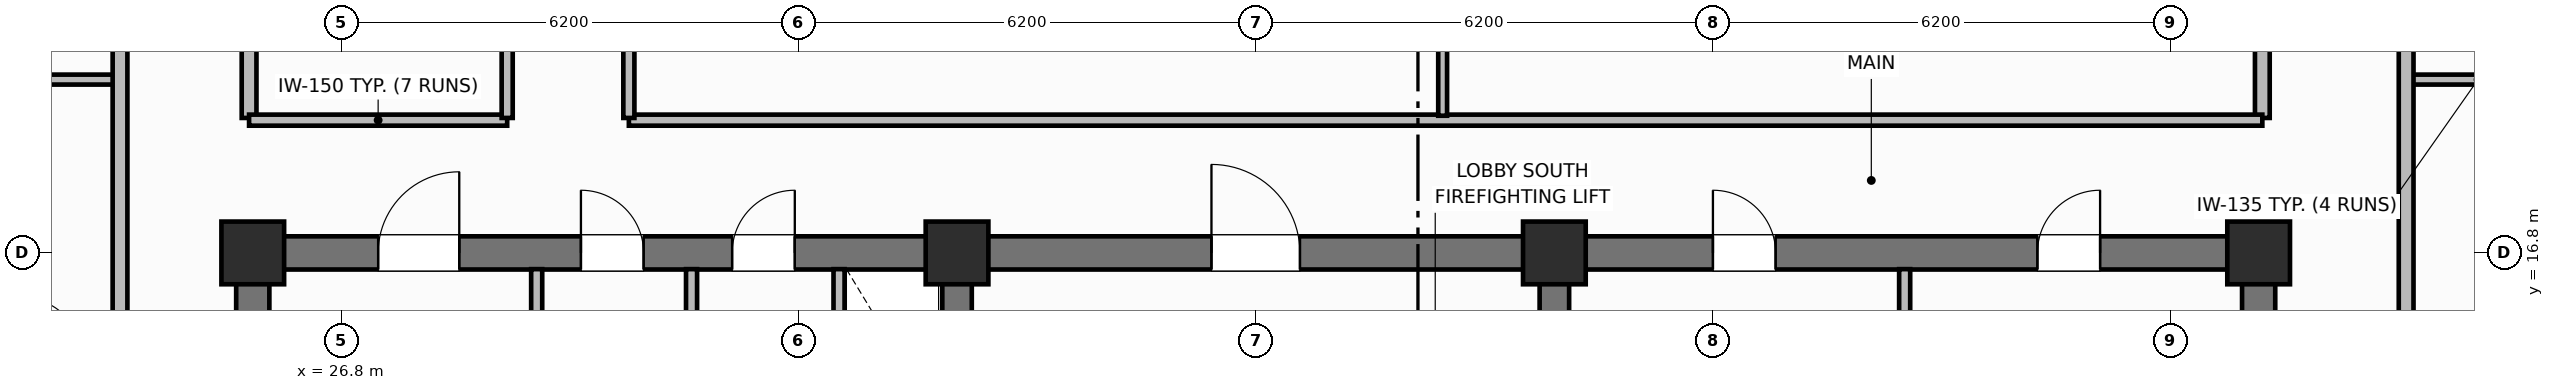
"""IFC4 building model, lengths in metres.
Left out: names, types, materials, properties, quantities, classifications, styles, units other than length and angle.
Written with IfcOpenShell. Run it as: python <this file> out.ifc"""

import sys

from ifc_helpers import new_model, si_unit, direction, frame, frame_2d, origin, origin_2d, place, context, subcontext, project, spatial, rectangle, extrude, element, fill, save


model = new_model("IFC4")
c1 = context("Model", 3, precision=1e-05, world=origin(), true_north=direction((0.0, 1.0)))
c2 = subcontext(c1, "Body", "Model", "MODEL_VIEW")
j1 = project(units=[si_unit("LENGTHUNIT", "METRE"), si_unit("PLANEANGLEUNIT", "RADIAN")], contexts=[c1])
p1 = place(None, origin())
s1 = spatial("IfcSite", under=j1, at=p1, CompositionType="ELEMENT")
p2 = place(p1, origin())
s2 = spatial("IfcBuilding", under=s1, at=p2, CompositionType="ELEMENT")
p3 = place(p2, frame((0.0, 0.0, 244.3)))
s3 = spatial("IfcBuildingStorey", under=s2, at=p3, CompositionType="ELEMENT", Elevation=244.3)
for number, where, z_axis, x_axis in (
    (1, (25.6, 10.825, 0.0), (0.0, 0.0, 1.0), (0.0, 1.0, 0.0)),
    (2, (52.8, 10.825, 0.0), (0.0, 0.0, 1.0), (0.0, 1.0, 0.0)),
):
    element("IfcWall", number, at=place(p3, frame(where, z_axis=z_axis, x_axis=x_axis)), inside=s3, PredefinedType="SHEAR", context=c2, shape_type="SweptSolid", body=[
        extrude(rectangle(XDim=5.75, YDim=0.45, at=frame_2d((2.875, 0.0))), origin(), (0.0, 0.0, 1.0), 3.7),
    ])
p4 = place(p3, frame((25.6, 16.8, 0.0), z_axis=(0.0, 0.0, 1.0), x_axis=(1.0, 0.0, 0.0)))
e3 = element("IfcWall", 3, at=p4, inside=s3, PredefinedType="SHEAR", context=c2, shape_type="SweptSolid", body=[
    extrude(rectangle(XDim=27.2, YDim=0.45, at=frame_2d((13.6, 0.0))), origin(), (0.0, 0.0, 1.0), 3.7),
])
p5 = place(p4, frame((1.7, 0.0, 0.0)))
e4 = element("IfcOpeningElement", 4, at=p5, cuts=e3, PredefinedType="OPENING", context=c2, shape_type="SweptSolid", body=[
    extrude(rectangle(XDim=1.1, YDim=2.15, at=frame_2d((0.55, 1.075))), frame((0.0, 0.235, 0.0), z_axis=(0.0, -1.0, 0.0), x_axis=(1.0, 0.0, 0.0)), (0.0, 0.0, 1.0), 0.47),
])
p6 = place(p4, frame((4.45, 0.0, 0.0)))
e5 = element("IfcOpeningElement", 5, at=p6, cuts=e3, PredefinedType="OPENING", context=c2, shape_type="SweptSolid", body=[
    extrude(rectangle(XDim=0.85, YDim=2.1, at=frame_2d((0.425, 1.05))), frame((0.0, 0.235, 0.0), z_axis=(0.0, -1.0, 0.0), x_axis=(1.0, 0.0, 0.0)), (0.0, 0.0, 1.0), 0.47),
])
p7 = place(p4, frame((6.5, 0.0, 0.0)))
e6 = element("IfcOpeningElement", 6, at=p7, cuts=e3, PredefinedType="OPENING", context=c2, shape_type="SweptSolid", body=[
    extrude(rectangle(XDim=0.85, YDim=2.1, at=frame_2d((0.425, 1.05))), frame((0.0, 0.235, 0.0), z_axis=(0.0, -1.0, 0.0), x_axis=(1.0, 0.0, 0.0)), (0.0, 0.0, 1.0), 0.47),
])
p8 = place(p4, frame((13.0, 0.0, 0.0)))
e7 = element("IfcOpeningElement", 7, at=p8, cuts=e3, PredefinedType="OPENING", context=c2, shape_type="SweptSolid", body=[
    extrude(rectangle(XDim=1.2, YDim=2.15, at=frame_2d((0.6, 1.075))), frame((0.0, 0.235, 0.0), z_axis=(0.0, -1.0, 0.0), x_axis=(1.0, 0.0, 0.0)), (0.0, 0.0, 1.0), 0.47),
])
p9 = place(p4, frame((19.8, 0.0, 0.0)))
e8 = element("IfcOpeningElement", 8, at=p9, cuts=e3, PredefinedType="OPENING", context=c2, shape_type="SweptSolid", body=[
    extrude(rectangle(XDim=0.85, YDim=2.1, at=frame_2d((0.425, 1.05))), frame((0.0, 0.235, 0.0), z_axis=(0.0, -1.0, 0.0), x_axis=(1.0, 0.0, 0.0)), (0.0, 0.0, 1.0), 0.47),
])
p10 = place(p4, frame((24.2, 0.0, 0.0)))
e9 = element("IfcOpeningElement", 9, at=p10, cuts=e3, PredefinedType="OPENING", context=c2, shape_type="SweptSolid", body=[
    extrude(rectangle(XDim=0.85, YDim=2.1, at=frame_2d((0.425, 1.05))), frame((0.0, 0.235, 0.0), z_axis=(0.0, -1.0, 0.0), x_axis=(1.0, 0.0, 0.0)), (0.0, 0.0, 1.0), 0.47),
])
for number, where, z_axis, x_axis in (
    (10, (35.15, 10.825, 0.0), (0.0, 0.0, 1.0), (0.0, 1.0, 0.0)),
    (11, (43.25, 10.825, 0.0), (0.0, 0.0, 1.0), (0.0, 1.0, 0.0)),
):
    element("IfcWall", number, at=place(p3, frame(where, z_axis=z_axis, x_axis=x_axis)), inside=s3, PredefinedType="SHEAR", context=c2, shape_type="SweptSolid", body=[
        extrude(rectangle(XDim=5.75, YDim=0.4, at=frame_2d((2.875, 0.0))), origin(), (0.0, 0.0, 1.0), 3.7),
    ])
for number, where, z_axis, x_axis in (
    (12, (25.6, 16.8, 0.0), (0.0, 0.0, 1.0), (1.0, 0.0, 0.0)),
    (13, (35.15, 16.8, 0.0), (0.0, 0.0, 1.0), (1.0, 0.0, 0.0)),
    (14, (43.25, 16.8, 0.0), (0.0, 0.0, 1.0), (1.0, 0.0, 0.0)),
    (15, (52.8, 16.8, 0.0), (0.0, 0.0, 1.0), (1.0, 0.0, 0.0)),
):
    element("IfcColumn", number, at=place(p3, frame(where, z_axis=z_axis, x_axis=x_axis)), inside=s3, PredefinedType="COLUMN", context=c2, shape_type="SweptSolid", body=[
        extrude(rectangle(XDim=0.85, YDim=0.85, at=origin_2d()), origin(), (0.0, 0.0, 1.0), 3.7),
    ])
for number, where, z_axis, x_axis in (
    (16, (29.45, 14.5, 0.0), (0.0, 0.0, 1.0), (0.0, 1.0, 0.0)),
    (17, (31.55, 14.5, 0.0), (0.0, 0.0, 1.0), (0.0, 1.0, 0.0)),
):
    element("IfcWall", number, at=place(p3, frame(where, z_axis=z_axis, x_axis=x_axis)), inside=s3, PredefinedType="PARTITIONING", context=c2, shape_type="SweptSolid", body=[
        extrude(rectangle(XDim=2.08, YDim=0.15, at=frame_2d((1.04, 0.0))), origin(), (0.0, 0.0, 1.0), 2.56),
    ])
p11 = place(p3, frame((33.55, 14.5, 0.0), z_axis=(0.0, 0.0, 1.0), x_axis=(0.0, 1.0, 0.0)))
e18 = element("IfcWall", 18, at=p11, inside=s3, PredefinedType="PARTITIONING", context=c2, shape_type="SweptSolid", body=[
    extrude(rectangle(XDim=2.08, YDim=0.15, at=frame_2d((1.04, 0.0))), origin(), (0.0, 0.0, 1.0), 2.56),
])
p12 = place(p11, frame((0.55, 0.0, 0.0)))
e19 = element("IfcOpeningElement", 19, at=p12, cuts=e18, PredefinedType="OPENING", context=c2, shape_type="SweptSolid", body=[
    extrude(rectangle(XDim=0.85, YDim=2.05, at=frame_2d((0.425, 1.025))), frame((0.0, 0.085, 0.0), z_axis=(0.0, -1.0, 0.0), x_axis=(1.0, 0.0, 0.0)), (0.0, 0.0, 1.0), 0.17),
])
p13 = place(p3, frame((48.0, 10.95, 0.0), z_axis=(0.0, 0.0, 1.0), x_axis=(0.0, 1.0, 0.0)))
e20 = element("IfcWall", 20, at=p13, inside=s3, PredefinedType="PARTITIONING", context=c2, shape_type="SweptSolid", body=[
    extrude(rectangle(XDim=5.63, YDim=0.15, at=frame_2d((2.815, 0.0))), origin(), (0.0, 0.0, 1.0), 2.56),
])
for number, where, z_axis, x_axis in (
    (21, (25.55, 18.63, 0.0), (0.0, 0.0, 1.0), (0.0, 1.0, 0.0)),
    (22, (52.85, 18.63, 0.0), (0.0, 0.0, 1.0), (0.0, 1.0, 0.0)),
):
    element("IfcWall", number, at=place(p3, frame(where, z_axis=z_axis, x_axis=x_axis)), inside=s3, PredefinedType="PARTITIONING", context=c2, shape_type="SweptSolid", body=[
        extrude(rectangle(XDim=19.14, YDim=0.2, at=frame_2d((9.57, 0.0))), origin(), (0.0, 0.0, 1.0), 2.56),
    ])
p14 = place(p3, frame((25.55, 18.6, 0.0), z_axis=(0.0, 0.0, 1.0), x_axis=(1.0, 0.0, 0.0)))
e23 = element("IfcWall", 23, at=p14, inside=s3, PredefinedType="PARTITIONING", context=c2, shape_type="SweptSolid", body=[
    extrude(rectangle(XDim=3.5, YDim=0.15, at=frame_2d((1.75, 0.0))), origin(), (0.0, 0.0, 1.0), 2.56),
])
p15 = place(p3, frame((30.7, 18.6, 0.0), z_axis=(0.0, 0.0, 1.0), x_axis=(1.0, 0.0, 0.0)))
e24 = element("IfcWall", 24, at=p15, inside=s3, PredefinedType="PARTITIONING", context=c2, shape_type="SweptSolid", body=[
    extrude(rectangle(XDim=22.15, YDim=0.15, at=frame_2d((11.075, 0.0))), origin(), (0.0, 0.0, 1.0), 2.56),
])
p16 = place(p3, frame((41.735, 18.66, 0.0), z_axis=(0.0, 0.0, 1.0), x_axis=(0.0, 1.0, 0.0)))
e25 = element("IfcWall", 25, at=p16, inside=s3, PredefinedType="PARTITIONING", context=c2, shape_type="SweptSolid", body=[
    extrude(rectangle(XDim=10.648, YDim=0.12, at=frame_2d((5.324, 0.0))), origin(), (0.0, 0.0, 1.0), 2.56),
])
p17 = place(p16, frame((2.0, 0.0, 0.0)))
e26 = element("IfcOpeningElement", 26, at=p17, cuts=e25, PredefinedType="OPENING", context=c2, shape_type="SweptSolid", body=[
    extrude(rectangle(XDim=0.9, YDim=2.1, at=frame_2d((0.45, 1.05))), frame((0.0, 0.07, 0.0), z_axis=(0.0, -1.0, 0.0), x_axis=(1.0, 0.0, 0.0)), (0.0, 0.0, 1.0), 0.14),
])
p18 = place(p3, frame((29.05, 18.63, 0.0), z_axis=(0.0, 0.0, 1.0), x_axis=(0.0, 1.0, 0.0)))
e27 = element("IfcWall", 27, at=p18, inside=s3, PredefinedType="PARTITIONING", context=c2, shape_type="SweptSolid", body=[
    extrude(rectangle(XDim=19.14, YDim=0.15, at=frame_2d((9.57, 0.0))), origin(), (0.0, 0.0, 1.0), 2.56),
])
p19 = place(p18, frame((5.5, 0.0, 0.0)))
e28 = element("IfcOpeningElement", 28, at=p19, cuts=e27, PredefinedType="OPENING", context=c2, shape_type="SweptSolid", body=[
    extrude(rectangle(XDim=1.0, YDim=2.15, at=frame_2d((0.5, 1.075))), frame((0.0, 0.085, 0.0), z_axis=(0.0, -1.0, 0.0), x_axis=(1.0, 0.0, 0.0)), (0.0, 0.0, 1.0), 0.17),
])
p20 = place(p3, frame((30.7, 18.63, 0.0), z_axis=(0.0, 0.0, 1.0), x_axis=(0.0, 1.0, 0.0)))
e29 = element("IfcWall", 29, at=p20, inside=s3, PredefinedType="PARTITIONING", context=c2, shape_type="SweptSolid", body=[
    extrude(rectangle(XDim=19.14, YDim=0.15, at=frame_2d((9.57, 0.0))), origin(), (0.0, 0.0, 1.0), 2.56),
])
p21 = place(p20, frame((2.2, 0.0, 0.0)))
e30 = element("IfcOpeningElement", 30, at=p21, cuts=e29, PredefinedType="OPENING", context=c2, shape_type="SweptSolid", body=[
    extrude(rectangle(XDim=1.0, YDim=2.15, at=frame_2d((0.5, 1.075))), frame((0.0, 0.085, 0.0), z_axis=(0.0, -1.0, 0.0), x_axis=(1.0, 0.0, 0.0)), (0.0, 0.0, 1.0), 0.17),
])
p22 = place(p20, frame((12.719, 0.0, 0.0)))
e31 = element("IfcOpeningElement", 31, at=p22, cuts=e29, PredefinedType="OPENING", context=c2, shape_type="SweptSolid", body=[
    extrude(rectangle(XDim=1.0, YDim=2.15, at=frame_2d((0.5, 1.075))), frame((0.0, 0.085, 0.0), z_axis=(0.0, -1.0, 0.0), x_axis=(1.0, 0.0, 0.0)), (0.0, 0.0, 1.0), 0.17),
])
p23 = place(p3, frame((21.85, 19.15, 0.0), z_axis=(0.0, 0.0, 1.0), x_axis=(1.0, 0.0, 0.0)))
e32 = element("IfcWall", 32, at=p23, inside=s3, PredefinedType="PARTITIONING", context=c2, shape_type="SweptSolid", body=[
    extrude(rectangle(XDim=1.95, YDim=0.135, at=frame_2d((0.975, 0.0))), origin(), (0.0, 0.0, 1.0), 2.56),
])
p24 = place(p3, frame((23.8, 9.95, 0.0), z_axis=(0.0, 0.0, 1.0), x_axis=(0.0, 1.0, 0.0)))
e33 = element("IfcWall", 33, at=p24, inside=s3, PredefinedType="PARTITIONING", context=c2, shape_type="SweptSolid", body=[
    extrude(rectangle(XDim=36.5, YDim=0.2, at=frame_2d((18.25, 0.0))), origin(), (0.0, 0.0, 1.0), 2.56),
])
p25 = place(p24, frame((3.25, 0.0, 0.0)))
e34 = element("IfcOpeningElement", 34, at=p25, cuts=e33, PredefinedType="OPENING", context=c2, shape_type="SweptSolid", body=[
    extrude(rectangle(XDim=1.0, YDim=2.15, at=frame_2d((0.5, 1.075))), frame((0.0, 0.11, 0.0), z_axis=(0.0, -1.0, 0.0), x_axis=(1.0, 0.0, 0.0)), (0.0, 0.0, 1.0), 0.22),
])
p26 = place(p24, frame((13.3, 0.0, 0.0)))
e35 = element("IfcOpeningElement", 35, at=p26, cuts=e33, PredefinedType="OPENING", context=c2, shape_type="SweptSolid", body=[
    extrude(rectangle(XDim=1.0, YDim=2.15, at=frame_2d((0.5, 1.075))), frame((0.0, 0.11, 0.0), z_axis=(0.0, -1.0, 0.0), x_axis=(1.0, 0.0, 0.0)), (0.0, 0.0, 1.0), 0.22),
])
p27 = place(p24, frame((25.005, 0.0, 0.0)))
e36 = element("IfcOpeningElement", 36, at=p27, cuts=e33, PredefinedType="OPENING", context=c2, shape_type="SweptSolid", body=[
    extrude(rectangle(XDim=1.0, YDim=2.15, at=frame_2d((0.5, 1.075))), frame((0.0, 0.11, 0.0), z_axis=(0.0, -1.0, 0.0), x_axis=(1.0, 0.0, 0.0)), (0.0, 0.0, 1.0), 0.22),
])
p28 = place(p3, frame((54.8, 19.15, 0.0), z_axis=(0.0, 0.0, 1.0), x_axis=(1.0, 0.0, 0.0)))
e37 = element("IfcWall", 37, at=p28, inside=s3, PredefinedType="PARTITIONING", context=c2, shape_type="SweptSolid", body=[
    extrude(rectangle(XDim=1.95, YDim=0.135, at=frame_2d((0.975, 0.0))), origin(), (0.0, 0.0, 1.0), 2.56),
])
p29 = place(p3, frame((54.8, 9.95, 0.0), z_axis=(0.0, 0.0, 1.0), x_axis=(0.0, 1.0, 0.0)))
e38 = element("IfcWall", 38, at=p29, inside=s3, PredefinedType="PARTITIONING", context=c2, shape_type="SweptSolid", body=[
    extrude(rectangle(XDim=36.5, YDim=0.2, at=frame_2d((18.25, 0.0))), origin(), (0.0, 0.0, 1.0), 2.56),
])
p30 = place(p29, frame((3.25, 0.0, 0.0)))
e39 = element("IfcOpeningElement", 39, at=p30, cuts=e38, PredefinedType="OPENING", context=c2, shape_type="SweptSolid", body=[
    extrude(rectangle(XDim=1.0, YDim=2.15, at=frame_2d((0.5, 1.075))), frame((0.0, 0.11, 0.0), z_axis=(0.0, -1.0, 0.0), x_axis=(1.0, 0.0, 0.0)), (0.0, 0.0, 1.0), 0.22),
])
p31 = place(p29, frame((12.96, 0.0, 0.0)))
e40 = element("IfcOpeningElement", 40, at=p31, cuts=e38, PredefinedType="OPENING", context=c2, shape_type="SweptSolid", body=[
    extrude(rectangle(XDim=1.0, YDim=2.15, at=frame_2d((0.5, 1.075))), frame((0.0, 0.11, 0.0), z_axis=(0.0, -1.0, 0.0), x_axis=(1.0, 0.0, 0.0)), (0.0, 0.0, 1.0), 0.22),
])
p32 = place(p29, frame((24.3, 0.0, 0.0)))
e41 = element("IfcOpeningElement", 41, at=p32, cuts=e38, PredefinedType="OPENING", context=c2, shape_type="SweptSolid", body=[
    extrude(rectangle(XDim=1.0, YDim=2.15, at=frame_2d((0.5, 1.075))), frame((0.0, 0.11, 0.0), z_axis=(0.0, -1.0, 0.0), x_axis=(1.0, 0.0, 0.0)), (0.0, 0.0, 1.0), 0.22),
])
p33 = place(p5, origin())
e42 = element("IfcDoor", 42, at=p33, inside=s3, OperationType="SINGLE_SWING_RIGHT", PredefinedType="DOOR", context=c2, shape_type="SweptSolid", body=[
    extrude(rectangle(XDim=1.1, YDim=2.15, at=frame_2d((0.55, 1.075))), frame((0.0, 0.025, 0.0), z_axis=(0.0, -1.0, 0.0), x_axis=(1.0, 0.0, 0.0)), (0.0, 0.0, 1.0), 0.05),
])
fill(e4, e42)
p34 = place(p6, origin())
e43 = element("IfcDoor", 43, at=p34, inside=s3, OperationType="SINGLE_SWING_LEFT", PredefinedType="DOOR", context=c2, shape_type="SweptSolid", body=[
    extrude(rectangle(XDim=0.85, YDim=2.1, at=frame_2d((0.425, 1.05))), frame((0.0, 0.025, 0.0), z_axis=(0.0, -1.0, 0.0), x_axis=(1.0, 0.0, 0.0)), (0.0, 0.0, 1.0), 0.05),
])
fill(e5, e43)
p35 = place(p7, origin())
e44 = element("IfcDoor", 44, at=p35, inside=s3, OperationType="SINGLE_SWING_RIGHT", PredefinedType="DOOR", context=c2, shape_type="SweptSolid", body=[
    extrude(rectangle(XDim=0.85, YDim=2.1, at=frame_2d((0.425, 1.05))), frame((0.0, 0.025, 0.0), z_axis=(0.0, -1.0, 0.0), x_axis=(1.0, 0.0, 0.0)), (0.0, 0.0, 1.0), 0.05),
])
fill(e6, e44)
p36 = place(p8, origin())
e45 = element("IfcDoor", 45, at=p36, inside=s3, OperationType="SINGLE_SWING_LEFT", PredefinedType="DOOR", context=c2, shape_type="SweptSolid", body=[
    extrude(rectangle(XDim=1.2, YDim=2.15, at=frame_2d((0.6, 1.075))), frame((0.0, 0.025, 0.0), z_axis=(0.0, -1.0, 0.0), x_axis=(1.0, 0.0, 0.0)), (0.0, 0.0, 1.0), 0.05),
])
fill(e7, e45)
p37 = place(p9, origin())
e46 = element("IfcDoor", 46, at=p37, inside=s3, OperationType="SINGLE_SWING_LEFT", PredefinedType="DOOR", context=c2, shape_type="SweptSolid", body=[
    extrude(rectangle(XDim=0.85, YDim=2.1, at=frame_2d((0.425, 1.05))), frame((0.0, 0.025, 0.0), z_axis=(0.0, -1.0, 0.0), x_axis=(1.0, 0.0, 0.0)), (0.0, 0.0, 1.0), 0.05),
])
fill(e8, e46)
p38 = place(p10, origin())
e47 = element("IfcDoor", 47, at=p38, inside=s3, OperationType="SINGLE_SWING_RIGHT", PredefinedType="DOOR", context=c2, shape_type="SweptSolid", body=[
    extrude(rectangle(XDim=0.85, YDim=2.1, at=frame_2d((0.425, 1.05))), frame((0.0, 0.025, 0.0), z_axis=(0.0, -1.0, 0.0), x_axis=(1.0, 0.0, 0.0)), (0.0, 0.0, 1.0), 0.05),
])
fill(e9, e47)
save(model, sys.argv[1])
